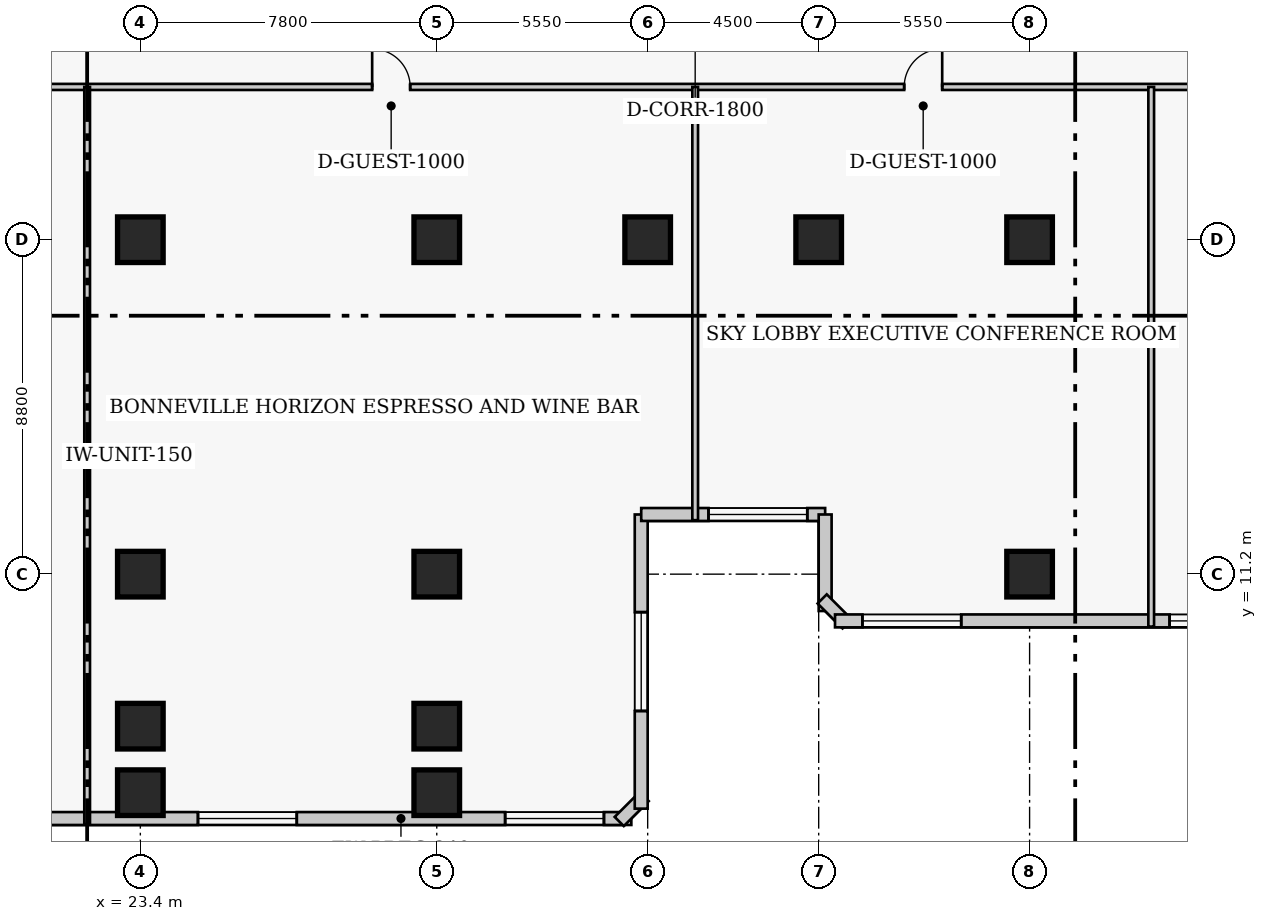
"""IFC4 building model, lengths in metres.
Left out: names, types, materials, properties, quantities, classifications, styles, units other than length and angle.
Written with IfcOpenShell. Run it as: python <this file> out.ifc"""

import sys

from ifc_helpers import new_model, si_unit, direction, frame, frame_2d, origin, origin_2d, place, context, subcontext, project, spatial, rectangle, extrude, element, fill, save


model = new_model("IFC4")
c1 = context("Model", 3, precision=1e-05, world=origin(), true_north=direction((0.0, 1.0)))
c2 = subcontext(c1, "Body", "Model", "MODEL_VIEW")
j1 = project(units=[si_unit("LENGTHUNIT", "METRE"), si_unit("PLANEANGLEUNIT", "RADIAN")], contexts=[c1])
p1 = place(None, origin())
s1 = spatial("IfcSite", under=j1, at=p1, CompositionType="ELEMENT")
p2 = place(p1, origin())
s2 = spatial("IfcBuilding", under=s1, at=p2, CompositionType="ELEMENT")
p3 = place(p2, frame((0.0, 0.0, 129.8)))
s3 = spatial("IfcBuildingStorey", under=s2, at=p3, CompositionType="ELEMENT", Elevation=129.8)
for number, where, z_axis, x_axis in (
    (1, (23.4, 11.2, 0.0), (0.0, 0.0, 1.0), (1.0, 0.0, 0.0)),
    (2, (23.4, 20.0, 0.0), (0.0, 0.0, 1.0), (1.0, 0.0, 0.0)),
    (3, (31.2, 11.2, 0.0), (0.0, 0.0, 1.0), (1.0, 0.0, 0.0)),
    (4, (31.2, 20.0, 0.0), (0.0, 0.0, 1.0), (1.0, 0.0, 0.0)),
    (5, (36.75, 20.0, 0.0), (0.0, 0.0, 1.0), (1.0, 0.0, 0.0)),
    (6, (41.25, 20.0, 0.0), (0.0, 0.0, 1.0), (1.0, 0.0, 0.0)),
    (7, (46.8, 11.2, 0.0), (0.0, 0.0, 1.0), (1.0, 0.0, 0.0)),
    (8, (46.8, 20.0, 0.0), (0.0, 0.0, 1.0), (1.0, 0.0, 0.0)),
    (9, (23.4, 7.2, 0.0), (0.0, 0.0, 1.0), (1.0, 0.0, 0.0)),
    (10, (31.2, 7.2, 0.0), (0.0, 0.0, 1.0), (1.0, 0.0, 0.0)),
    (11, (23.4, 5.45, 0.0), (0.0, 0.0, 1.0), (1.0, 0.0, 0.0)),
    (12, (31.2, 5.45, 0.0), (0.0, 0.0, 1.0), (1.0, 0.0, 0.0)),
):
    element("IfcColumn", number, at=place(p3, frame(where, z_axis=z_axis, x_axis=x_axis)), inside=s3, PredefinedType="COLUMN", context=c2, shape_type="SweptSolid", body=[
        extrude(rectangle(XDim=1.2, YDim=1.2, at=origin_2d()), origin(), (0.0, 0.0, 1.0), 4.8),
    ])
p4 = place(p3, frame((8.03, 4.77, 0.0), z_axis=(0.0, 0.0, 1.0), x_axis=(1.0, 0.0, 0.0)))
e13 = element("IfcWall", 13, at=p4, inside=s3, PredefinedType="SOLIDWALL", context=c2, shape_type="SweptSolid", body=[
    extrude(rectangle(XDim=28.29, YDim=0.34, at=frame_2d((14.145, 0.0))), origin(), (0.0, 0.0, 1.0), 4.55),
])
p5 = place(p4, frame((0.721, 0.0, 0.65)))
e14 = element("IfcOpeningElement", 14, at=p5, cuts=e13, PredefinedType="OPENING", context=c2, shape_type="SweptSolid", body=[
    extrude(rectangle(XDim=2.6, YDim=2.2, at=frame_2d((1.3, 1.1))), frame((0.0, 0.18, 0.0), z_axis=(0.0, -1.0, 0.0), x_axis=(1.0, 0.0, 0.0)), (0.0, 0.0, 1.0), 0.36),
])
p6 = place(p4, frame((4.762, 0.0, 0.65)))
e15 = element("IfcOpeningElement", 15, at=p6, cuts=e13, PredefinedType="OPENING", context=c2, shape_type="SweptSolid", body=[
    extrude(rectangle(XDim=2.6, YDim=2.2, at=frame_2d((1.3, 1.1))), frame((0.0, 0.18, 0.0), z_axis=(0.0, -1.0, 0.0), x_axis=(1.0, 0.0, 0.0)), (0.0, 0.0, 1.0), 0.36),
])
p7 = place(p4, frame((8.804, 0.0, 0.65)))
e16 = element("IfcOpeningElement", 16, at=p7, cuts=e13, PredefinedType="OPENING", context=c2, shape_type="SweptSolid", body=[
    extrude(rectangle(XDim=2.6, YDim=2.2, at=frame_2d((1.3, 1.1))), frame((0.0, 0.18, 0.0), z_axis=(0.0, -1.0, 0.0), x_axis=(1.0, 0.0, 0.0)), (0.0, 0.0, 1.0), 0.36),
])
p8 = place(p4, frame((16.886, 0.0, 0.65)))
e17 = element("IfcOpeningElement", 17, at=p8, cuts=e13, PredefinedType="OPENING", context=c2, shape_type="SweptSolid", body=[
    extrude(rectangle(XDim=2.6, YDim=2.2, at=frame_2d((1.3, 1.1))), frame((0.0, 0.18, 0.0), z_axis=(0.0, -1.0, 0.0), x_axis=(1.0, 0.0, 0.0)), (0.0, 0.0, 1.0), 0.36),
])
p9 = place(p4, frame((24.969, 0.0, 0.65)))
e18 = element("IfcOpeningElement", 18, at=p9, cuts=e13, PredefinedType="OPENING", context=c2, shape_type="SweptSolid", body=[
    extrude(rectangle(XDim=2.6, YDim=2.2, at=frame_2d((1.3, 1.1))), frame((0.0, 0.18, 0.0), z_axis=(0.0, -1.0, 0.0), x_axis=(1.0, 0.0, 0.0)), (0.0, 0.0, 1.0), 0.36),
])
p10 = place(p3, frame((36.001, 4.692, 0.0), z_axis=(0.0, 0.0, 1.0), x_axis=(0.707238225886, 0.706975312048, 0.0)))
e19 = element("IfcWall", 19, at=p10, inside=s3, PredefinedType="SOLIDWALL", context=c2, shape_type="SweptSolid", body=[
    extrude(rectangle(XDim=0.929, YDim=0.34, at=frame_2d((0.464, 0.0))), origin(), (0.0, 0.0, 1.0), 4.55),
])
p11 = place(p3, frame((36.58, 5.03, 0.0), z_axis=(0.0, 0.0, 1.0), x_axis=(0.0, 1.0, 0.0)))
e20 = element("IfcWall", 20, at=p11, inside=s3, PredefinedType="SOLIDWALL", context=c2, shape_type="SweptSolid", body=[
    extrude(rectangle(XDim=7.74, YDim=0.34, at=frame_2d((3.87, 0.0))), origin(), (0.0, 0.0, 1.0), 4.55),
])
p12 = place(p11, frame((2.57, 0.0, 0.65)))
e21 = element("IfcOpeningElement", 21, at=p12, cuts=e20, PredefinedType="OPENING", context=c2, shape_type="SweptSolid", body=[
    extrude(rectangle(XDim=2.6, YDim=2.2, at=frame_2d((1.3, 1.1))), frame((0.0, 0.18, 0.0), z_axis=(0.0, -1.0, 0.0), x_axis=(1.0, 0.0, 0.0)), (0.0, 0.0, 1.0), 0.36),
])
p13 = place(p3, frame((36.58, 12.77, 0.0), z_axis=(0.0, 0.0, 1.0), x_axis=(1.0, 0.0, 0.0)))
e22 = element("IfcWall", 22, at=p13, inside=s3, PredefinedType="SOLIDWALL", context=c2, shape_type="SweptSolid", body=[
    extrude(rectangle(XDim=4.84, YDim=0.34, at=frame_2d((2.42, 0.0))), origin(), (0.0, 0.0, 1.0), 4.55),
])
p14 = place(p13, frame((1.77, 0.0, 0.65)))
e23 = element("IfcOpeningElement", 23, at=p14, cuts=e22, PredefinedType="OPENING", context=c2, shape_type="SweptSolid", body=[
    extrude(rectangle(XDim=2.6, YDim=2.2, at=frame_2d((1.3, 1.1))), frame((0.0, 0.18, 0.0), z_axis=(0.0, -1.0, 0.0), x_axis=(1.0, 0.0, 0.0)), (0.0, 0.0, 1.0), 0.36),
])
p15 = place(p3, frame((41.42, 12.77, 0.0), z_axis=(0.0, 0.0, 1.0), x_axis=(0.0, -1.0, 0.0)))
e24 = element("IfcWall", 24, at=p15, inside=s3, PredefinedType="SOLIDWALL", context=c2, shape_type="SweptSolid", body=[
    extrude(rectangle(XDim=2.54, YDim=0.34, at=frame_2d((1.27, 0.0))), origin(), (0.0, 0.0, 1.0), 4.55),
])
p16 = place(p3, frame((41.342, 10.549, 0.0), z_axis=(0.0, 0.0, 1.0), x_axis=(0.707106781187, -0.707106781187, 0.0)))
e25 = element("IfcWall", 25, at=p16, inside=s3, PredefinedType="SOLIDWALL", context=c2, shape_type="SweptSolid", body=[
    extrude(rectangle(XDim=0.929, YDim=0.34, at=frame_2d((0.464, 0.0))), origin(), (0.0, 0.0, 1.0), 4.55),
])
p17 = place(p3, frame((41.68, 9.97, 0.0), z_axis=(0.0, 0.0, 1.0), x_axis=(1.0, 0.0, 0.0)))
e26 = element("IfcWall", 26, at=p17, inside=s3, PredefinedType="SOLIDWALL", context=c2, shape_type="SweptSolid", body=[
    extrude(rectangle(XDim=28.29, YDim=0.34, at=frame_2d((14.145, 0.0))), origin(), (0.0, 0.0, 1.0), 4.55),
])
p18 = place(p17, frame((0.721, 0.0, 0.65)))
e27 = element("IfcOpeningElement", 27, at=p18, cuts=e26, PredefinedType="OPENING", context=c2, shape_type="SweptSolid", body=[
    extrude(rectangle(XDim=2.6, YDim=2.2, at=frame_2d((1.3, 1.1))), frame((0.0, 0.18, 0.0), z_axis=(0.0, -1.0, 0.0), x_axis=(1.0, 0.0, 0.0)), (0.0, 0.0, 1.0), 0.36),
])
p19 = place(p17, frame((8.804, 0.0, 0.65)))
e28 = element("IfcOpeningElement", 28, at=p19, cuts=e26, PredefinedType="OPENING", context=c2, shape_type="SweptSolid", body=[
    extrude(rectangle(XDim=2.6, YDim=2.2, at=frame_2d((1.3, 1.1))), frame((0.0, 0.18, 0.0), z_axis=(0.0, -1.0, 0.0), x_axis=(1.0, 0.0, 0.0)), (0.0, 0.0, 1.0), 0.36),
])
p20 = place(p17, frame((13.995, 0.0, 0.65)))
e29 = element("IfcOpeningElement", 29, at=p20, cuts=e26, PredefinedType="OPENING", context=c2, shape_type="SweptSolid", body=[
    extrude(rectangle(XDim=2.6, YDim=2.2, at=frame_2d((1.3, 1.1))), frame((0.0, 0.18, 0.0), z_axis=(0.0, -1.0, 0.0), x_axis=(1.0, 0.0, 0.0)), (0.0, 0.0, 1.0), 0.36),
])
p21 = place(p17, frame((16.886, 0.0, 0.65)))
e30 = element("IfcOpeningElement", 30, at=p21, cuts=e26, PredefinedType="OPENING", context=c2, shape_type="SweptSolid", body=[
    extrude(rectangle(XDim=2.6, YDim=2.2, at=frame_2d((1.3, 1.1))), frame((0.0, 0.18, 0.0), z_axis=(0.0, -1.0, 0.0), x_axis=(1.0, 0.0, 0.0)), (0.0, 0.0, 1.0), 0.36),
])
p22 = place(p17, frame((21.578, 0.0, 0.65)))
e31 = element("IfcOpeningElement", 31, at=p22, cuts=e26, PredefinedType="OPENING", context=c2, shape_type="SweptSolid", body=[
    extrude(rectangle(XDim=2.6, YDim=2.2, at=frame_2d((1.3, 1.1))), frame((0.0, 0.18, 0.0), z_axis=(0.0, -1.0, 0.0), x_axis=(1.0, 0.0, 0.0)), (0.0, 0.0, 1.0), 0.36),
])
p23 = place(p17, frame((24.969, 0.0, 0.65)))
e32 = element("IfcOpeningElement", 32, at=p23, cuts=e26, PredefinedType="OPENING", context=c2, shape_type="SweptSolid", body=[
    extrude(rectangle(XDim=2.6, YDim=2.2, at=frame_2d((1.3, 1.1))), frame((0.0, 0.18, 0.0), z_axis=(0.0, -1.0, 0.0), x_axis=(1.0, 0.0, 0.0)), (0.0, 0.0, 1.0), 0.36),
])
p24 = place(p3, frame((4.3, 24.02, 0.0), z_axis=(0.0, 0.0, 1.0), x_axis=(1.0, 0.0, 0.0)))
e33 = element("IfcWall", 33, at=p24, inside=s3, PredefinedType="PARTITIONING", context=c2, shape_type="SweptSolid", body=[
    extrude(rectangle(XDim=69.4, YDim=0.16, at=frame_2d((34.7, 0.0))), origin(), (0.0, 0.0, 1.0), 4.55),
])
p25 = place(p24, frame((8.45, 0.0, 0.0)))
e34 = element("IfcOpeningElement", 34, at=p25, cuts=e33, PredefinedType="OPENING", context=c2, shape_type="SweptSolid", body=[
    extrude(rectangle(XDim=1.0, YDim=2.15, at=frame_2d((0.5, 1.075))), frame((0.0, 0.09, 0.0), z_axis=(0.0, -1.0, 0.0), x_axis=(1.0, 0.0, 0.0)), (0.0, 0.0, 1.0), 0.18),
])
p26 = place(p24, frame((25.2, 0.0, 0.0)))
e35 = element("IfcOpeningElement", 35, at=p26, cuts=e33, PredefinedType="OPENING", context=c2, shape_type="SweptSolid", body=[
    extrude(rectangle(XDim=1.0, YDim=2.15, at=frame_2d((0.5, 1.075))), frame((0.0, 0.09, 0.0), z_axis=(0.0, -1.0, 0.0), x_axis=(1.0, 0.0, 0.0)), (0.0, 0.0, 1.0), 0.18),
])
p27 = place(p24, frame((39.2, 0.0, 0.0)))
e36 = element("IfcOpeningElement", 36, at=p27, cuts=e33, PredefinedType="OPENING", context=c2, shape_type="SweptSolid", body=[
    extrude(rectangle(XDim=1.0, YDim=2.15, at=frame_2d((0.5, 1.075))), frame((0.0, 0.09, 0.0), z_axis=(0.0, -1.0, 0.0), x_axis=(1.0, 0.0, 0.0)), (0.0, 0.0, 1.0), 0.18),
])
p28 = place(p24, frame((56.95, 0.0, 0.0)))
e37 = element("IfcOpeningElement", 37, at=p28, cuts=e33, PredefinedType="OPENING", context=c2, shape_type="SweptSolid", body=[
    extrude(rectangle(XDim=1.0, YDim=2.15, at=frame_2d((0.5, 1.075))), frame((0.0, 0.09, 0.0), z_axis=(0.0, -1.0, 0.0), x_axis=(1.0, 0.0, 0.0)), (0.0, 0.0, 1.0), 0.18),
])
p29 = place(p3, frame((22.0, 4.62, 0.0), z_axis=(0.0, 0.0, 1.0), x_axis=(0.0, 1.0, 0.0)))
e38 = element("IfcWall", 38, at=p29, inside=s3, PredefinedType="PARTITIONING", context=c2, shape_type="SweptSolid", body=[
    extrude(rectangle(XDim=19.4, YDim=0.15, at=frame_2d((9.7, 0.0))), origin(), (0.0, 0.0, 1.0), 4.053),
])
p30 = place(p3, frame((38.0, 12.62, 0.0), z_axis=(0.0, 0.0, 1.0), x_axis=(0.0, 1.0, 0.0)))
e39 = element("IfcWall", 39, at=p30, inside=s3, PredefinedType="PARTITIONING", context=c2, shape_type="SweptSolid", body=[
    extrude(rectangle(XDim=11.4, YDim=0.15, at=frame_2d((5.7, 0.0))), origin(), (0.0, 0.0, 1.0), 4.55),
])
p31 = place(p3, frame((50.0, 9.82, 0.0), z_axis=(0.0, 0.0, 1.0), x_axis=(0.0, 1.0, 0.0)))
e40 = element("IfcWall", 40, at=p31, inside=s3, PredefinedType="PARTITIONING", context=c2, shape_type="SweptSolid", body=[
    extrude(rectangle(XDim=14.2, YDim=0.15, at=frame_2d((7.1, 0.0))), origin(), (0.0, 0.0, 1.0), 4.053),
])
p32 = place(p8, origin())
e41 = element("IfcWindow", 41, at=p32, inside=s3, PartitioningType="SINGLE_PANEL", PredefinedType="WINDOW", context=c2, shape_type="SweptSolid", body=[
    extrude(rectangle(XDim=2.6, YDim=2.2, at=frame_2d((1.3, 1.1))), frame((0.0, 0.03, 0.0), z_axis=(0.0, -1.0, 0.0), x_axis=(1.0, 0.0, 0.0)), (0.0, 0.0, 1.0), 0.06),
])
fill(e17, e41)
p33 = place(p9, origin())
e42 = element("IfcWindow", 42, at=p33, inside=s3, PartitioningType="SINGLE_PANEL", PredefinedType="WINDOW", context=c2, shape_type="SweptSolid", body=[
    extrude(rectangle(XDim=2.6, YDim=2.2, at=frame_2d((1.3, 1.1))), frame((0.0, 0.03, 0.0), z_axis=(0.0, -1.0, 0.0), x_axis=(1.0, 0.0, 0.0)), (0.0, 0.0, 1.0), 0.06),
])
fill(e18, e42)
p34 = place(p12, origin())
e43 = element("IfcWindow", 43, at=p34, inside=s3, PartitioningType="SINGLE_PANEL", PredefinedType="WINDOW", context=c2, shape_type="SweptSolid", body=[
    extrude(rectangle(XDim=2.6, YDim=2.2, at=frame_2d((1.3, 1.1))), frame((0.0, 0.03, 0.0), z_axis=(0.0, -1.0, 0.0), x_axis=(1.0, 0.0, 0.0)), (0.0, 0.0, 1.0), 0.06),
])
fill(e21, e43)
p35 = place(p14, origin())
e44 = element("IfcWindow", 44, at=p35, inside=s3, PartitioningType="SINGLE_PANEL", PredefinedType="WINDOW", context=c2, shape_type="SweptSolid", body=[
    extrude(rectangle(XDim=2.6, YDim=2.2, at=frame_2d((1.3, 1.1))), frame((0.0, 0.03, 0.0), z_axis=(0.0, -1.0, 0.0), x_axis=(1.0, 0.0, 0.0)), (0.0, 0.0, 1.0), 0.06),
])
fill(e23, e44)
p36 = place(p18, origin())
e45 = element("IfcWindow", 45, at=p36, inside=s3, PartitioningType="SINGLE_PANEL", PredefinedType="WINDOW", context=c2, shape_type="SweptSolid", body=[
    extrude(rectangle(XDim=2.6, YDim=2.2, at=frame_2d((1.3, 1.1))), frame((0.0, 0.03, 0.0), z_axis=(0.0, -1.0, 0.0), x_axis=(1.0, 0.0, 0.0)), (0.0, 0.0, 1.0), 0.06),
])
fill(e27, e45)
p37 = place(p19, origin())
e46 = element("IfcWindow", 46, at=p37, inside=s3, PartitioningType="SINGLE_PANEL", PredefinedType="WINDOW", context=c2, shape_type="SweptSolid", body=[
    extrude(rectangle(XDim=2.6, YDim=2.2, at=frame_2d((1.3, 1.1))), frame((0.0, 0.03, 0.0), z_axis=(0.0, -1.0, 0.0), x_axis=(1.0, 0.0, 0.0)), (0.0, 0.0, 1.0), 0.06),
])
fill(e28, e46)
p38 = place(p26, origin())
e47 = element("IfcDoor", 47, at=p38, inside=s3, OperationType="SINGLE_SWING_LEFT", PredefinedType="DOOR", context=c2, shape_type="SweptSolid", body=[
    extrude(rectangle(XDim=1.0, YDim=2.15, at=frame_2d((0.5, 1.075))), frame((0.0, 0.025, 0.0), z_axis=(0.0, -1.0, 0.0), x_axis=(1.0, 0.0, 0.0)), (0.0, 0.0, 1.0), 0.05),
])
fill(e35, e47)
p39 = place(p27, origin())
e48 = element("IfcDoor", 48, at=p39, inside=s3, OperationType="SINGLE_SWING_RIGHT", PredefinedType="DOOR", context=c2, shape_type="SweptSolid", body=[
    extrude(rectangle(XDim=1.0, YDim=2.15, at=frame_2d((0.5, 1.075))), frame((0.0, 0.025, 0.0), z_axis=(0.0, -1.0, 0.0), x_axis=(1.0, 0.0, 0.0)), (0.0, 0.0, 1.0), 0.05),
])
fill(e36, e48)
save(model, sys.argv[1])
